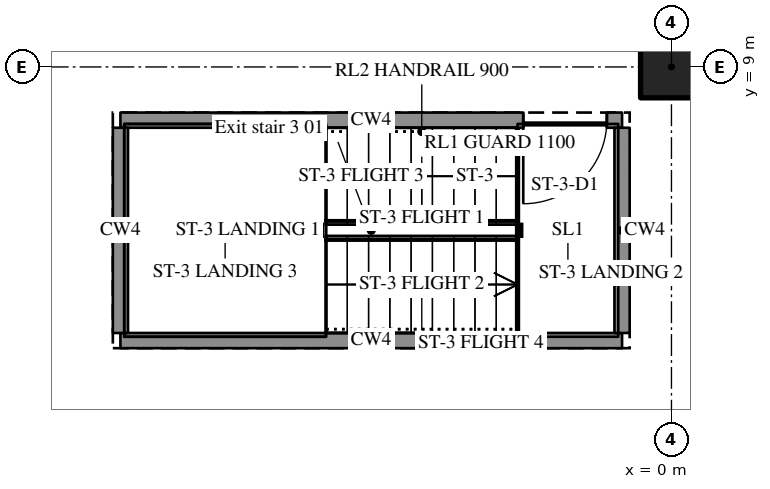
"""IFC4 building model, lengths in metres.
Left out: names, types, materials, properties, quantities, classifications, styles, units other than length and angle.
Written with IfcOpenShell. Run it as: python <this file> out.ifc"""

import sys

from ifc_helpers import new_model, si_unit, direction, frame, frame_2d, origin, origin_2d, place, context, subcontext, project, spatial, rectangle, hollow_circle, extrude, element, fill, save


model = new_model("IFC4")
c1 = context("Model", 3, precision=1e-05, world=origin(), true_north=direction((0.0, 1.0)))
c2 = subcontext(c1, "Body", "Model", "MODEL_VIEW")
j1 = project(units=[si_unit("LENGTHUNIT", "METRE"), si_unit("PLANEANGLEUNIT", "RADIAN")], contexts=[c1])
p1 = place(None, origin())
s1 = spatial("IfcSite", under=j1, at=p1, CompositionType="ELEMENT")
p2 = place(p1, origin())
s2 = spatial("IfcBuilding", under=s1, at=p2, CompositionType="ELEMENT")
p3 = place(p2, frame((0.0, 0.0, 114.3)))
s3 = spatial("IfcBuildingStorey", under=s2, at=p3, CompositionType="ELEMENT", Elevation=114.3)
p4 = place(p3, frame((0.0, 9.0, 0.0), z_axis=(0.0, 0.0, 1.0), x_axis=(1.0, 0.0, 0.0)))
e1 = element("IfcColumn", 1, at=p4, inside=s3, PredefinedType="COLUMN", context=c2, shape_type="SweptSolid", body=[
    extrude(hollow_circle(Radius=0.406, WallThickness=0.036, at=origin_2d()), origin(), (0.0, 0.0, 1.0), 7.2),
])
p5 = place(p3, frame((-7.25, 5.4, 0.0), z_axis=(0.0, 0.0, 1.0), x_axis=(1.0, 0.0, 0.0)))
e2 = element("IfcWall", 2, at=p5, inside=s3, PredefinedType="SHEAR", context=c2, shape_type="SweptSolid", body=[
    extrude(rectangle(XDim=6.6, YDim=0.2, at=frame_2d((3.3, 0.0))), origin(), (0.0, 0.0, 1.0), 7.2),
])
p6 = place(p3, frame((-0.65, 8.3, 0.0), z_axis=(0.0, 0.0, 1.0), x_axis=(-1.0, 0.0, 0.0)))
e3 = element("IfcWall", 3, at=p6, inside=s3, PredefinedType="SHEAR", context=c2, shape_type="SweptSolid", body=[
    extrude(rectangle(XDim=6.6, YDim=0.2, at=frame_2d((3.3, 0.0))), origin(), (0.0, 0.0, 1.0), 7.2),
])
p7 = place(p6, frame((0.2, 0.0, 0.0)))
e4 = element("IfcOpeningElement", 4, at=p7, cuts=e3, PredefinedType="OPENING", context=c2, shape_type="SweptSolid", body=[
    extrude(rectangle(XDim=1.1, YDim=2.1, at=frame_2d((0.55, 1.05))), frame((0.0, 0.11, 0.0), z_axis=(0.0, -1.0, 0.0), x_axis=(1.0, 0.0, 0.0)), (0.0, 0.0, 1.0), 0.22),
])
for number, where, z_axis, x_axis in (
    (5, (-7.25, 5.5, 0.0), (0.0, 0.0, 1.0), (0.0, 1.0, 0.0)),
    (6, (-0.65, 5.5, 0.0), (0.0, 0.0, 1.0), (0.0, 1.0, 0.0)),
):
    element("IfcWall", number, at=place(p3, frame(where, z_axis=z_axis, x_axis=x_axis)), inside=s3, PredefinedType="SHEAR", context=c2, shape_type="SweptSolid", body=[
        extrude(rectangle(XDim=2.7, YDim=0.2, at=frame_2d((1.35, 0.0))), origin(), (0.0, 0.0, 1.0), 7.2),
    ])
p8 = place(p7, origin())
e7 = element("IfcDoor", 7, at=p8, inside=s3, OperationType="SINGLE_SWING_RIGHT", PredefinedType="DOOR", context=c2, shape_type="SweptSolid", body=[
    extrude(rectangle(XDim=1.1, YDim=2.1, at=frame_2d((0.55, 1.05))), frame((0.0, 0.025, 0.0), z_axis=(0.0, -1.0, 0.0), x_axis=(1.0, 0.0, 0.0)), (0.0, 0.0, 1.0), 0.05),
])
fill(e4, e7)
save(model, sys.argv[1])
